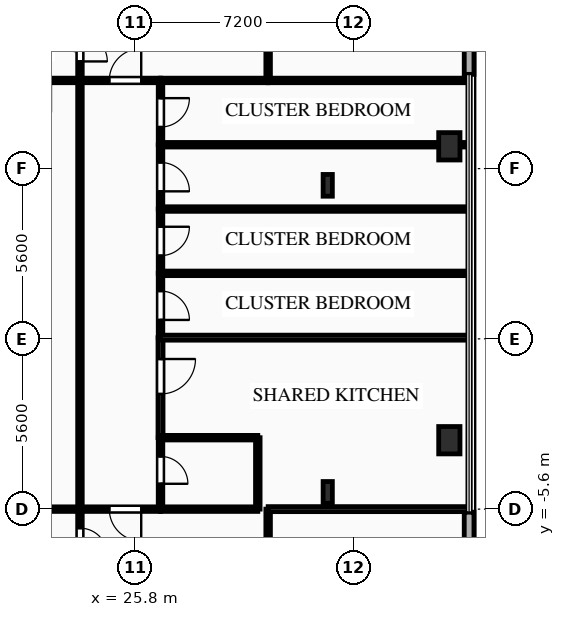
"""IFC4 building model, lengths in metres.
Left out: names, types, materials, properties, quantities, classifications, styles, units other than length and angle.
Written with IfcOpenShell. Run it as: python <this file> out.ifc"""

import sys

from ifc_helpers import new_model, si_unit, direction, frame, frame_2d, origin, origin_2d, place, context, subcontext, project, spatial, rectangle, i_section, extrude, element, fill, save


model = new_model("IFC4")
c1 = context("Model", 3, precision=1e-05, world=origin(), true_north=direction((0.0, 1.0)))
c2 = subcontext(c1, "Body", "Model", "MODEL_VIEW")
j1 = project(units=[si_unit("LENGTHUNIT", "METRE"), si_unit("PLANEANGLEUNIT", "RADIAN")], contexts=[c1])
p1 = place(None, origin())
s1 = spatial("IfcSite", under=j1, at=p1, CompositionType="ELEMENT")
p2 = place(p1, origin())
s2 = spatial("IfcBuilding", under=s1, at=p2, CompositionType="ELEMENT")
p3 = place(p2, frame((0.0, 0.0, 18.0)))
s3 = spatial("IfcBuildingStorey", under=s2, at=p3, CompositionType="ELEMENT", Elevation=18.0)
for number, where, z_axis, x_axis in (
    (1, (36.15, -3.333, 0.0), (0.0, 0.0, 1.0), (1.0, 0.0, 0.0)),
    (2, (36.15, 6.333, 0.0), (0.0, 0.0, 1.0), (1.0, 0.0, 0.0)),
):
    element("IfcColumn", number, at=place(p3, frame(where, z_axis=z_axis, x_axis=x_axis)), inside=s3, PredefinedType="COLUMN", context=c2, shape_type="SweptSolid", body=[
        extrude(rectangle(XDim=0.7, YDim=0.9, at=origin_2d()), origin(), (0.0, 0.0, 1.0), 4.5),
    ])
for number, where, z_axis, x_axis in (
    (3, (32.15, -5.05, 0.0), (0.0, 0.0, 1.0), (1.0, 0.0, 0.0)),
    (4, (32.15, 5.05, 0.0), (0.0, 0.0, 1.0), (1.0, 0.0, 0.0)),
):
    element("IfcColumn", number, at=place(p3, frame(where, z_axis=z_axis, x_axis=x_axis)), inside=s3, PredefinedType="COLUMN", context=c2, shape_type="SweptSolid", body=[
        extrude(i_section(OverallWidth=0.304, OverallDepth=0.716, WebThickness=0.021, FlangeThickness=0.04, FilletRadius=0.027, at=origin_2d()), origin(), (0.0, 0.0, 1.0), 4.5),
    ])
p4 = place(p3, frame((36.8, 24.8, 0.0), z_axis=(0.0, 0.0, 1.0), x_axis=(0.0, -1.0, 0.0)))
e5 = element("IfcWall", 5, at=p4, inside=s3, PredefinedType="SOLIDWALL", context=c2, shape_type="SweptSolid", body=[
    extrude(rectangle(XDim=16.1, YDim=0.32, at=frame_2d((8.05, 0.0))), origin(), (0.0, 0.0, 1.0), 4.17),
])
p5 = place(p4, frame((5.067, 0.0, 0.85)))
e6 = element("IfcOpeningElement", 6, at=p5, cuts=e5, PredefinedType="OPENING", context=c2, shape_type="SweptSolid", body=[
    extrude(rectangle(XDim=2.6, YDim=2.4, at=frame_2d((1.3, 1.2))), frame((0.0, 0.17, 0.0), z_axis=(0.0, -1.0, 0.0), x_axis=(1.0, 0.0, 0.0)), (0.0, 0.0, 1.0), 0.34),
])
p6 = place(p3, frame((36.8, -5.7, 0.0), z_axis=(0.0, 0.0, 1.0), x_axis=(0.0, -1.0, 0.0)))
e7 = element("IfcWall", 7, at=p6, inside=s3, PredefinedType="SOLIDWALL", context=c2, shape_type="SweptSolid", body=[
    extrude(rectangle(XDim=16.1, YDim=0.32, at=frame_2d((8.05, 0.0))), origin(), (0.0, 0.0, 1.0), 4.17),
])
p7 = place(p6, frame((8.485, 0.0, 0.85)))
e8 = element("IfcOpeningElement", 8, at=p7, cuts=e7, PredefinedType="OPENING", context=c2, shape_type="SweptSolid", body=[
    extrude(rectangle(XDim=2.6, YDim=2.4, at=frame_2d((1.3, 1.2))), frame((0.0, 0.17, 0.0), z_axis=(0.0, -1.0, 0.0), x_axis=(1.0, 0.0, 0.0)), (0.0, 0.0, 1.0), 0.34),
])
p8 = place(p3, frame((24.0, 10.65, 0.0), z_axis=(0.0, 0.0, 1.0), x_axis=(0.0, -1.0, 0.0)))
e9 = element("IfcWall", 9, at=p8, inside=s3, PredefinedType="PARTITIONING", context=c2, shape_type="SweptSolid", body=[
    extrude(rectangle(XDim=2.15, YDim=0.15, at=frame_2d((1.075, 0.0))), origin(), (0.0, 0.0, 1.0), 4.17),
])
p9 = place(p8, frame((0.625, 0.0, 0.0)))
e10 = element("IfcOpeningElement", 10, at=p9, cuts=e9, PredefinedType="OPENING", context=c2, shape_type="SweptSolid", body=[
    extrude(rectangle(XDim=0.9, YDim=2.1, at=frame_2d((0.45, 1.05))), frame((0.0, 0.085, 0.0), z_axis=(0.0, -1.0, 0.0), x_axis=(1.0, 0.0, 0.0)), (0.0, 0.0, 1.0), 0.17),
])
p10 = place(p3, frame((24.0, 8.5, 0.0), z_axis=(0.0, 0.0, 1.0), x_axis=(-1.0, 0.0, 0.0)))
e11 = element("IfcWall", 11, at=p10, inside=s3, PredefinedType="PARTITIONING", context=c2, shape_type="SweptSolid", body=[
    extrude(rectangle(XDim=5.2, YDim=0.15, at=frame_2d((2.6, 0.0))), origin(), (0.0, 0.0, 1.0), 4.17),
])
p11 = place(p10, frame((0.954, 0.0, 0.0)))
e12 = element("IfcOpeningElement", 12, at=p11, cuts=e11, PredefinedType="OPENING", context=c2, shape_type="SweptSolid", body=[
    extrude(rectangle(XDim=1.05, YDim=2.15, at=frame_2d((0.525, 1.075))), frame((0.0, 0.085, 0.0), z_axis=(0.0, -1.0, 0.0), x_axis=(1.0, 0.0, 0.0)), (0.0, 0.0, 1.0), 0.17),
])
p12 = place(p3, frame((24.0, -5.6, 0.0), z_axis=(0.0, 0.0, 1.0), x_axis=(0.0, -1.0, 0.0)))
e13 = element("IfcWall", 13, at=p12, inside=s3, PredefinedType="PARTITIONING", context=c2, shape_type="SweptSolid", body=[
    extrude(rectangle(XDim=2.15, YDim=0.15, at=frame_2d((1.075, 0.0))), origin(), (0.0, 0.0, 1.0), 4.17),
])
p13 = place(p12, frame((0.625, 0.0, 0.0)))
e14 = element("IfcOpeningElement", 14, at=p13, cuts=e13, PredefinedType="OPENING", context=c2, shape_type="SweptSolid", body=[
    extrude(rectangle(XDim=0.9, YDim=2.1, at=frame_2d((0.45, 1.05))), frame((0.0, 0.085, 0.0), z_axis=(0.0, -1.0, 0.0), x_axis=(1.0, 0.0, 0.0)), (0.0, 0.0, 1.0), 0.17),
])
p14 = place(p3, frame((18.8, -5.6, 0.0), z_axis=(0.0, 0.0, 1.0), x_axis=(1.0, 0.0, 0.0)))
e15 = element("IfcWall", 15, at=p14, inside=s3, PredefinedType="PARTITIONING", context=c2, shape_type="SweptSolid", body=[
    extrude(rectangle(XDim=5.2, YDim=0.15, at=frame_2d((2.6, 0.0))), origin(), (0.0, 0.0, 1.0), 4.17),
])
p15 = place(p3, frame((24.0, 8.5, 0.0), z_axis=(0.0, 0.0, 1.0), x_axis=(1.0, 0.0, 0.0)))
e16 = element("IfcWall", 16, at=p15, inside=s3, PredefinedType="PARTITIONING", context=c2, shape_type="SweptSolid", body=[
    extrude(rectangle(XDim=2.65, YDim=0.15, at=frame_2d((1.325, 0.0))), origin(), (0.0, 0.0, 1.0), 4.17),
])
p16 = place(p15, frame((0.965, 0.0, 0.0)))
e17 = element("IfcOpeningElement", 17, at=p16, cuts=e16, PredefinedType="OPENING", context=c2, shape_type="SweptSolid", body=[
    extrude(rectangle(XDim=1.05, YDim=2.15, at=frame_2d((0.525, 1.075))), frame((0.0, 0.085, 0.0), z_axis=(0.0, -1.0, 0.0), x_axis=(1.0, 0.0, 0.0)), (0.0, 0.0, 1.0), 0.17),
])
p17 = place(p3, frame((26.65, -5.6, 0.0), z_axis=(0.0, 0.0, 1.0), x_axis=(-1.0, 0.0, 0.0)))
e18 = element("IfcWall", 18, at=p17, inside=s3, PredefinedType="PARTITIONING", context=c2, shape_type="SweptSolid", body=[
    extrude(rectangle(XDim=2.65, YDim=0.15, at=frame_2d((1.325, 0.0))), origin(), (0.0, 0.0, 1.0), 4.17),
])
p18 = place(p17, frame((0.635, 0.0, 0.0)))
e19 = element("IfcOpeningElement", 19, at=p18, cuts=e18, PredefinedType="OPENING", context=c2, shape_type="SweptSolid", body=[
    extrude(rectangle(XDim=1.05, YDim=2.15, at=frame_2d((0.525, 1.075))), frame((0.0, 0.085, 0.0), z_axis=(0.0, -1.0, 0.0), x_axis=(1.0, 0.0, 0.0)), (0.0, 0.0, 1.0), 0.17),
])
p19 = place(p3, frame((26.65, -3.25, 0.0), z_axis=(0.0, 0.0, 1.0), x_axis=(0.0, -1.0, 0.0)))
e20 = element("IfcWall", 20, at=p19, inside=s3, PredefinedType="PLUMBINGWALL", context=c2, shape_type="SweptSolid", body=[
    extrude(rectangle(XDim=2.35, YDim=0.15, at=frame_2d((1.175, 0.0))), origin(), (0.0, 0.0, 1.0), 4.17),
])
p20 = place(p19, frame((0.616, 0.0, 0.0)))
e21 = element("IfcOpeningElement", 21, at=p20, cuts=e20, PredefinedType="OPENING", context=c2, shape_type="SweptSolid", body=[
    extrude(rectangle(XDim=0.9, YDim=2.1, at=frame_2d((0.45, 1.05))), frame((0.0, 0.085, 0.0), z_axis=(0.0, -1.0, 0.0), x_axis=(1.0, 0.0, 0.0)), (0.0, 0.0, 1.0), 0.17),
])
p21 = place(p3, frame((26.65, 0.04, 0.0), z_axis=(0.0, 0.0, 1.0), x_axis=(0.0, -1.0, 0.0)))
e22 = element("IfcWall", 22, at=p21, inside=s3, PredefinedType="PARTITIONING", context=c2, shape_type="SweptSolid", body=[
    extrude(rectangle(XDim=3.29, YDim=0.165, at=frame_2d((1.645, 0.0))), origin(), (0.0, 0.0, 1.0), 4.17),
])
p22 = place(p21, frame((0.702, 0.0, 0.0)))
e23 = element("IfcOpeningElement", 23, at=p22, cuts=e22, PredefinedType="OPENING", context=c2, shape_type="SweptSolid", body=[
    extrude(rectangle(XDim=1.15, YDim=2.15, at=frame_2d((0.575, 1.075))), frame((0.0, 0.093, 0.0), z_axis=(0.0, -1.0, 0.0), x_axis=(1.0, 0.0, 0.0)), (0.0, 0.0, 1.0), 0.185),
])
p23 = place(p3, frame((26.65, 2.155, 0.0), z_axis=(0.0, 0.0, 1.0), x_axis=(0.0, -1.0, 0.0)))
e24 = element("IfcWall", 24, at=p23, inside=s3, PredefinedType="PARTITIONING", context=c2, shape_type="SweptSolid", body=[
    extrude(rectangle(XDim=2.115, YDim=0.15, at=frame_2d((1.058, 0.0))), origin(), (0.0, 0.0, 1.0), 4.17),
])
p24 = place(p23, frame((0.583, 0.0, 0.0)))
e25 = element("IfcOpeningElement", 25, at=p24, cuts=e24, PredefinedType="OPENING", context=c2, shape_type="SweptSolid", body=[
    extrude(rectangle(XDim=0.95, YDim=2.1, at=frame_2d((0.475, 1.05))), frame((0.0, 0.085, 0.0), z_axis=(0.0, -1.0, 0.0), x_axis=(1.0, 0.0, 0.0)), (0.0, 0.0, 1.0), 0.17),
])
p25 = place(p3, frame((26.65, 4.27, 0.0), z_axis=(0.0, 0.0, 1.0), x_axis=(0.0, -1.0, 0.0)))
e26 = element("IfcWall", 26, at=p25, inside=s3, PredefinedType="PARTITIONING", context=c2, shape_type="SweptSolid", body=[
    extrude(rectangle(XDim=2.115, YDim=0.15, at=frame_2d((1.058, 0.0))), origin(), (0.0, 0.0, 1.0), 4.17),
])
p26 = place(p25, frame((0.583, 0.0, 0.0)))
e27 = element("IfcOpeningElement", 27, at=p26, cuts=e26, PredefinedType="OPENING", context=c2, shape_type="SweptSolid", body=[
    extrude(rectangle(XDim=0.95, YDim=2.1, at=frame_2d((0.475, 1.05))), frame((0.0, 0.085, 0.0), z_axis=(0.0, -1.0, 0.0), x_axis=(1.0, 0.0, 0.0)), (0.0, 0.0, 1.0), 0.17),
])
p27 = place(p3, frame((26.65, 6.385, 0.0), z_axis=(0.0, 0.0, 1.0), x_axis=(0.0, -1.0, 0.0)))
e28 = element("IfcWall", 28, at=p27, inside=s3, PredefinedType="PARTITIONING", context=c2, shape_type="SweptSolid", body=[
    extrude(rectangle(XDim=2.115, YDim=0.15, at=frame_2d((1.058, 0.0))), origin(), (0.0, 0.0, 1.0), 4.17),
])
p28 = place(p27, frame((0.583, 0.0, 0.0)))
e29 = element("IfcOpeningElement", 29, at=p28, cuts=e28, PredefinedType="OPENING", context=c2, shape_type="SweptSolid", body=[
    extrude(rectangle(XDim=0.95, YDim=2.1, at=frame_2d((0.475, 1.05))), frame((0.0, 0.085, 0.0), z_axis=(0.0, -1.0, 0.0), x_axis=(1.0, 0.0, 0.0)), (0.0, 0.0, 1.0), 0.17),
])
p29 = place(p3, frame((26.65, 8.5, 0.0), z_axis=(0.0, 0.0, 1.0), x_axis=(0.0, -1.0, 0.0)))
e30 = element("IfcWall", 30, at=p29, inside=s3, PredefinedType="PARTITIONING", context=c2, shape_type="SweptSolid", body=[
    extrude(rectangle(XDim=2.115, YDim=0.15, at=frame_2d((1.058, 0.0))), origin(), (0.0, 0.0, 1.0), 4.17),
])
p30 = place(p29, frame((0.583, 0.0, 0.0)))
e31 = element("IfcOpeningElement", 31, at=p30, cuts=e30, PredefinedType="OPENING", context=c2, shape_type="SweptSolid", body=[
    extrude(rectangle(XDim=0.95, YDim=2.1, at=frame_2d((0.475, 1.05))), frame((0.0, 0.085, 0.0), z_axis=(0.0, -1.0, 0.0), x_axis=(1.0, 0.0, 0.0)), (0.0, 0.0, 1.0), 0.17),
])
p31 = place(p3, frame((24.0, -5.6, 0.0), z_axis=(0.0, 0.0, 1.0), x_axis=(0.0, 1.0, 0.0)))
e32 = element("IfcWall", 32, at=p31, inside=s3, PredefinedType="PARTITIONING", context=c2, shape_type="SweptSolid", body=[
    extrude(rectangle(XDim=14.1, YDim=0.15, at=frame_2d((7.05, 0.0))), origin(), (0.0, 0.0, 1.0), 4.17),
])
p32 = place(p3, frame((30.19, 24.8, 0.0), z_axis=(0.0, 0.0, 1.0), x_axis=(0.0, -1.0, 0.0)))
e33 = element("IfcWall", 33, at=p32, inside=s3, PredefinedType="PARTITIONING", context=c2, shape_type="SweptSolid", body=[
    extrude(rectangle(XDim=16.3, YDim=0.15, at=frame_2d((8.15, 0.0))), origin(), (0.0, 0.0, 1.0), 4.17),
])
p33 = place(p32, frame((12.909, 0.0, 0.0)))
e34 = element("IfcOpeningElement", 34, at=p33, cuts=e33, PredefinedType="OPENING", context=c2, shape_type="SweptSolid", body=[
    extrude(rectangle(XDim=1.05, YDim=2.15, at=frame_2d((0.525, 1.075))), frame((0.0, 0.085, 0.0), z_axis=(0.0, -1.0, 0.0), x_axis=(1.0, 0.0, 0.0)), (0.0, 0.0, 1.0), 0.17),
])
p34 = place(p3, frame((30.19, 8.5, 0.0), z_axis=(0.0, 0.0, 1.0), x_axis=(-1.0, 0.0, 0.0)))
e35 = element("IfcWall", 35, at=p34, inside=s3, PredefinedType="PARTITIONING", context=c2, shape_type="SweptSolid", body=[
    extrude(rectangle(XDim=3.54, YDim=0.15, at=frame_2d((1.77, 0.0))), origin(), (0.0, 0.0, 1.0), 4.17),
])
p35 = place(p3, frame((36.8, 8.5, 0.0), z_axis=(0.0, 0.0, 1.0), x_axis=(-1.0, 0.0, 0.0)))
e36 = element("IfcWall", 36, at=p35, inside=s3, PredefinedType="PARTITIONING", context=c2, shape_type="SweptSolid", body=[
    extrude(rectangle(XDim=6.61, YDim=0.15, at=frame_2d((3.305, 0.0))), origin(), (0.0, 0.0, 1.0), 4.17),
])
p36 = place(p3, frame((30.19, -5.6, 0.0), z_axis=(0.0, 0.0, 1.0), x_axis=(0.0, -1.0, 0.0)))
e37 = element("IfcWall", 37, at=p36, inside=s3, PredefinedType="PARTITIONING", context=c2, shape_type="SweptSolid", body=[
    extrude(rectangle(XDim=16.2, YDim=0.15, at=frame_2d((8.1, 0.0))), origin(), (0.0, 0.0, 1.0), 4.17),
])
p37 = place(p36, frame((4.077, 0.0, 0.0)))
e38 = element("IfcOpeningElement", 38, at=p37, cuts=e37, PredefinedType="OPENING", context=c2, shape_type="SweptSolid", body=[
    extrude(rectangle(XDim=1.05, YDim=2.15, at=frame_2d((0.525, 1.075))), frame((0.0, 0.085, 0.0), z_axis=(0.0, -1.0, 0.0), x_axis=(1.0, 0.0, 0.0)), (0.0, 0.0, 1.0), 0.17),
])
p38 = place(p3, frame((26.65, -5.6, 0.0), z_axis=(0.0, 0.0, 1.0), x_axis=(1.0, 0.0, 0.0)))
e39 = element("IfcWall", 39, at=p38, inside=s3, PredefinedType="PLUMBINGWALL", context=c2, shape_type="SweptSolid", body=[
    extrude(rectangle(XDim=3.2, YDim=0.15, at=frame_2d((1.6, 0.0))), origin(), (0.0, 0.0, 1.0), 4.17),
])
p39 = place(p3, frame((30.19, -5.6, 0.0), z_axis=(0.0, 0.0, 1.0), x_axis=(1.0, 0.0, 0.0)))
e40 = element("IfcWall", 40, at=p39, inside=s3, PredefinedType="PARTITIONING", context=c2, shape_type="SweptSolid", body=[
    extrude(rectangle(XDim=6.61, YDim=0.165, at=frame_2d((3.305, 0.0))), origin(), (0.0, 0.0, 1.0), 4.17),
])
p40 = place(p3, frame((26.65, -3.25, 0.0), z_axis=(0.0, 0.0, 1.0), x_axis=(1.0, 0.0, 0.0)))
e41 = element("IfcWall", 41, at=p40, inside=s3, PredefinedType="PLUMBINGWALL", context=c2, shape_type="SweptSolid", body=[
    extrude(rectangle(XDim=3.2, YDim=0.15, at=frame_2d((1.6, 0.0))), origin(), (0.0, 0.0, 1.0), 4.17),
])
p41 = place(p3, frame((29.85, -3.25, 0.0), z_axis=(0.0, 0.0, 1.0), x_axis=(0.0, -1.0, 0.0)))
e42 = element("IfcWall", 42, at=p41, inside=s3, PredefinedType="PLUMBINGWALL", context=c2, shape_type="SweptSolid", body=[
    extrude(rectangle(XDim=2.35, YDim=0.15, at=frame_2d((1.175, 0.0))), origin(), (0.0, 0.0, 1.0), 4.17),
])
p42 = place(p3, frame((26.65, 0.04, 0.0), z_axis=(0.0, 0.0, 1.0), x_axis=(1.0, 0.0, 0.0)))
e43 = element("IfcWall", 43, at=p42, inside=s3, PredefinedType="PARTITIONING", context=c2, shape_type="SweptSolid", body=[
    extrude(rectangle(XDim=10.15, YDim=0.165, at=frame_2d((5.075, 0.0))), origin(), (0.0, 0.0, 1.0), 4.17),
])
p43 = place(p3, frame((26.65, 2.155, 0.0), z_axis=(0.0, 0.0, 1.0), x_axis=(1.0, 0.0, 0.0)))
e44 = element("IfcWall", 44, at=p43, inside=s3, PredefinedType="PARTITIONING", context=c2, shape_type="SweptSolid", body=[
    extrude(rectangle(XDim=10.15, YDim=0.15, at=frame_2d((5.075, 0.0))), origin(), (0.0, 0.0, 1.0), 4.17),
])
p44 = place(p3, frame((26.65, 4.27, 0.0), z_axis=(0.0, 0.0, 1.0), x_axis=(1.0, 0.0, 0.0)))
e45 = element("IfcWall", 45, at=p44, inside=s3, PredefinedType="PARTITIONING", context=c2, shape_type="SweptSolid", body=[
    extrude(rectangle(XDim=10.15, YDim=0.15, at=frame_2d((5.075, 0.0))), origin(), (0.0, 0.0, 1.0), 3.655),
])
p45 = place(p3, frame((26.65, 6.385, 0.0), z_axis=(0.0, 0.0, 1.0), x_axis=(1.0, 0.0, 0.0)))
e46 = element("IfcWall", 46, at=p45, inside=s3, PredefinedType="PARTITIONING", context=c2, shape_type="SweptSolid", body=[
    extrude(rectangle(XDim=10.15, YDim=0.15, at=frame_2d((5.075, 0.0))), origin(), (0.0, 0.0, 1.0), 3.555),
])
p46 = place(p9, origin())
e47 = element("IfcDoor", 47, at=p46, inside=s3, OperationType="SINGLE_SWING_RIGHT", PredefinedType="DOOR", context=c2, shape_type="SweptSolid", body=[
    extrude(rectangle(XDim=0.9, YDim=2.1, at=frame_2d((0.45, 1.05))), frame((0.0, 0.025, 0.0), z_axis=(0.0, -1.0, 0.0), x_axis=(1.0, 0.0, 0.0)), (0.0, 0.0, 1.0), 0.05),
])
fill(e10, e47)
p47 = place(p13, origin())
e48 = element("IfcDoor", 48, at=p47, inside=s3, OperationType="SINGLE_SWING_RIGHT", PredefinedType="DOOR", context=c2, shape_type="SweptSolid", body=[
    extrude(rectangle(XDim=0.9, YDim=2.1, at=frame_2d((0.45, 1.05))), frame((0.0, 0.025, 0.0), z_axis=(0.0, -1.0, 0.0), x_axis=(1.0, 0.0, 0.0)), (0.0, 0.0, 1.0), 0.05),
])
fill(e14, e48)
p48 = place(p16, origin())
e49 = element("IfcDoor", 49, at=p48, inside=s3, OperationType="SINGLE_SWING_RIGHT", PredefinedType="DOOR", context=c2, shape_type="SweptSolid", body=[
    extrude(rectangle(XDim=1.05, YDim=2.15, at=frame_2d((0.525, 1.075))), frame((0.0, 0.025, 0.0), z_axis=(0.0, -1.0, 0.0), x_axis=(1.0, 0.0, 0.0)), (0.0, 0.0, 1.0), 0.05),
])
fill(e17, e49)
p49 = place(p18, origin())
e50 = element("IfcDoor", 50, at=p49, inside=s3, OperationType="SINGLE_SWING_LEFT", PredefinedType="DOOR", context=c2, shape_type="SweptSolid", body=[
    extrude(rectangle(XDim=1.05, YDim=2.15, at=frame_2d((0.525, 1.075))), frame((0.0, 0.025, 0.0), z_axis=(0.0, -1.0, 0.0), x_axis=(1.0, 0.0, 0.0)), (0.0, 0.0, 1.0), 0.05),
])
fill(e19, e50)
p50 = place(p20, origin())
e51 = element("IfcDoor", 51, at=p50, inside=s3, OperationType="SINGLE_SWING_RIGHT", PredefinedType="DOOR", context=c2, shape_type="SweptSolid", body=[
    extrude(rectangle(XDim=0.9, YDim=2.1, at=frame_2d((0.45, 1.05))), frame((0.0, 0.025, 0.0), z_axis=(0.0, -1.0, 0.0), x_axis=(1.0, 0.0, 0.0)), (0.0, 0.0, 1.0), 0.05),
])
fill(e21, e51)
p51 = place(p22, origin())
e52 = element("IfcDoor", 52, at=p51, inside=s3, OperationType="SINGLE_SWING_LEFT", PredefinedType="DOOR", context=c2, shape_type="SweptSolid", body=[
    extrude(rectangle(XDim=1.15, YDim=2.15, at=frame_2d((0.575, 1.075))), frame((0.0, 0.025, 0.0), z_axis=(0.0, -1.0, 0.0), x_axis=(1.0, 0.0, 0.0)), (0.0, 0.0, 1.0), 0.05),
])
fill(e23, e52)
p52 = place(p24, origin())
e53 = element("IfcDoor", 53, at=p52, inside=s3, OperationType="SINGLE_SWING_RIGHT", PredefinedType="DOOR", context=c2, shape_type="SweptSolid", body=[
    extrude(rectangle(XDim=0.95, YDim=2.1, at=frame_2d((0.475, 1.05))), frame((0.0, 0.025, 0.0), z_axis=(0.0, -1.0, 0.0), x_axis=(1.0, 0.0, 0.0)), (0.0, 0.0, 1.0), 0.05),
])
fill(e25, e53)
p53 = place(p26, origin())
e54 = element("IfcDoor", 54, at=p53, inside=s3, OperationType="SINGLE_SWING_LEFT", PredefinedType="DOOR", context=c2, shape_type="SweptSolid", body=[
    extrude(rectangle(XDim=0.95, YDim=2.1, at=frame_2d((0.475, 1.05))), frame((0.0, 0.025, 0.0), z_axis=(0.0, -1.0, 0.0), x_axis=(1.0, 0.0, 0.0)), (0.0, 0.0, 1.0), 0.05),
])
fill(e27, e54)
p54 = place(p28, origin())
e55 = element("IfcDoor", 55, at=p54, inside=s3, OperationType="SINGLE_SWING_RIGHT", PredefinedType="DOOR", context=c2, shape_type="SweptSolid", body=[
    extrude(rectangle(XDim=0.95, YDim=2.1, at=frame_2d((0.475, 1.05))), frame((0.0, 0.025, 0.0), z_axis=(0.0, -1.0, 0.0), x_axis=(1.0, 0.0, 0.0)), (0.0, 0.0, 1.0), 0.05),
])
fill(e29, e55)
p55 = place(p30, origin())
e56 = element("IfcDoor", 56, at=p55, inside=s3, OperationType="SINGLE_SWING_LEFT", PredefinedType="DOOR", context=c2, shape_type="SweptSolid", body=[
    extrude(rectangle(XDim=0.95, YDim=2.1, at=frame_2d((0.475, 1.05))), frame((0.0, 0.025, 0.0), z_axis=(0.0, -1.0, 0.0), x_axis=(1.0, 0.0, 0.0)), (0.0, 0.0, 1.0), 0.05),
])
fill(e31, e56)
save(model, sys.argv[1])
